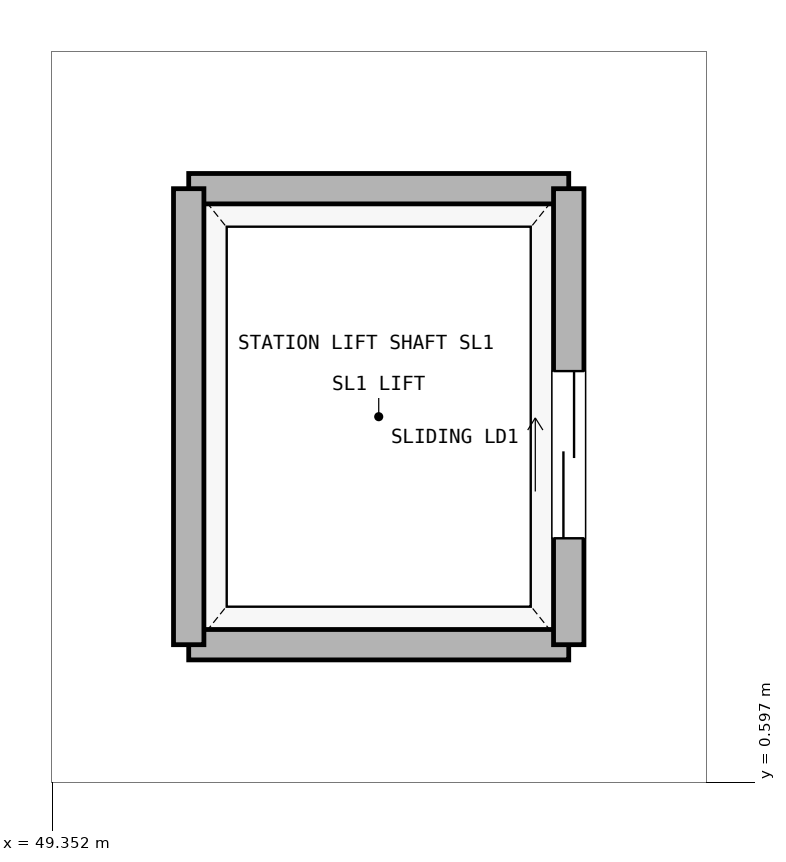
"""IFC4 building model, lengths in metres.
Left out: names, types, materials, properties, quantities, classifications, styles, units other than length and angle.
Written with IfcOpenShell. Run it as: python <this file> out.ifc"""

import sys

from ifc_helpers import new_model, si_unit, direction, frame, frame_2d, origin, place, context, subcontext, project, spatial, rectangle, extrude, element, fill, save


model = new_model("IFC4")
c1 = context("Model", 3, precision=1e-05, world=origin(), true_north=direction((0.0, 1.0)))
c2 = subcontext(c1, "Body", "Model", "MODEL_VIEW")
j1 = project(units=[si_unit("LENGTHUNIT", "METRE"), si_unit("PLANEANGLEUNIT", "RADIAN")], contexts=[c1])
p1 = place(None, origin())
s1 = spatial("IfcSite", under=j1, at=p1, CompositionType="ELEMENT")
p2 = place(p1, origin())
s2 = spatial("IfcBuilding", under=s1, at=p2, CompositionType="ELEMENT")
p3 = place(p2, origin())
s3 = spatial("IfcBuildingStorey", under=s2, at=p3, CompositionType="ELEMENT", Elevation=0.0)
for number, where, z_axis, x_axis in (
    (1, (50.25, 1.5, 0.0), (0.0, 0.0, 1.0), (1.0, 0.0, 0.0)),
    (2, (50.25, 4.5, 0.0), (0.0, 0.0, 1.0), (1.0, 0.0, 0.0)),
):
    element("IfcWall", number, at=place(p3, frame(where, z_axis=z_axis, x_axis=x_axis)), inside=s3, PredefinedType="PARTITIONING", context=c2, shape_type="SweptSolid", body=[
        extrude(rectangle(XDim=2.5, YDim=0.2, at=frame_2d((1.25, 0.0))), origin(), (0.0, 0.0, 1.0), 4.18),
    ])
p4 = place(p3, frame((50.25, 1.5, 0.0), z_axis=(0.0, 0.0, 1.0), x_axis=(0.0, 1.0, 0.0)))
e3 = element("IfcWall", 3, at=p4, inside=s3, PredefinedType="PARTITIONING", context=c2, shape_type="SweptSolid", body=[
    extrude(rectangle(XDim=3.0, YDim=0.2, at=frame_2d((1.5, 0.0))), origin(), (0.0, 0.0, 1.0), 4.18),
])
p5 = place(p3, frame((52.75, 1.5, 0.0), z_axis=(0.0, 0.0, 1.0), x_axis=(0.0, 1.0, 0.0)))
e4 = element("IfcWall", 4, at=p5, inside=s3, PredefinedType="PARTITIONING", context=c2, shape_type="SweptSolid", body=[
    extrude(rectangle(XDim=3.0, YDim=0.2, at=frame_2d((1.5, 0.0))), origin(), (0.0, 0.0, 1.0), 4.18),
])
p6 = place(p5, frame((0.7, 0.0, 0.0)))
e5 = element("IfcOpeningElement", 5, at=p6, cuts=e4, PredefinedType="OPENING", context=c2, shape_type="SweptSolid", body=[
    extrude(rectangle(XDim=1.1, YDim=2.25, at=frame_2d((0.55, 1.125))), frame((0.0, 0.11, 0.0), z_axis=(0.0, -1.0, 0.0), x_axis=(1.0, 0.0, 0.0)), (0.0, 0.0, 1.0), 0.22),
])
p7 = place(p6, origin())
e6 = element("IfcDoor", 6, at=p7, inside=s3, OperationType="DOUBLE_DOOR_SLIDING", PredefinedType="DOOR", context=c2, shape_type="SweptSolid", body=[
    extrude(rectangle(XDim=1.1, YDim=2.25, at=frame_2d((0.55, 1.125))), frame((0.0, 0.025, 0.0), z_axis=(0.0, -1.0, 0.0), x_axis=(1.0, 0.0, 0.0)), (0.0, 0.0, 1.0), 0.05),
])
fill(e5, e6)
save(model, sys.argv[1])
